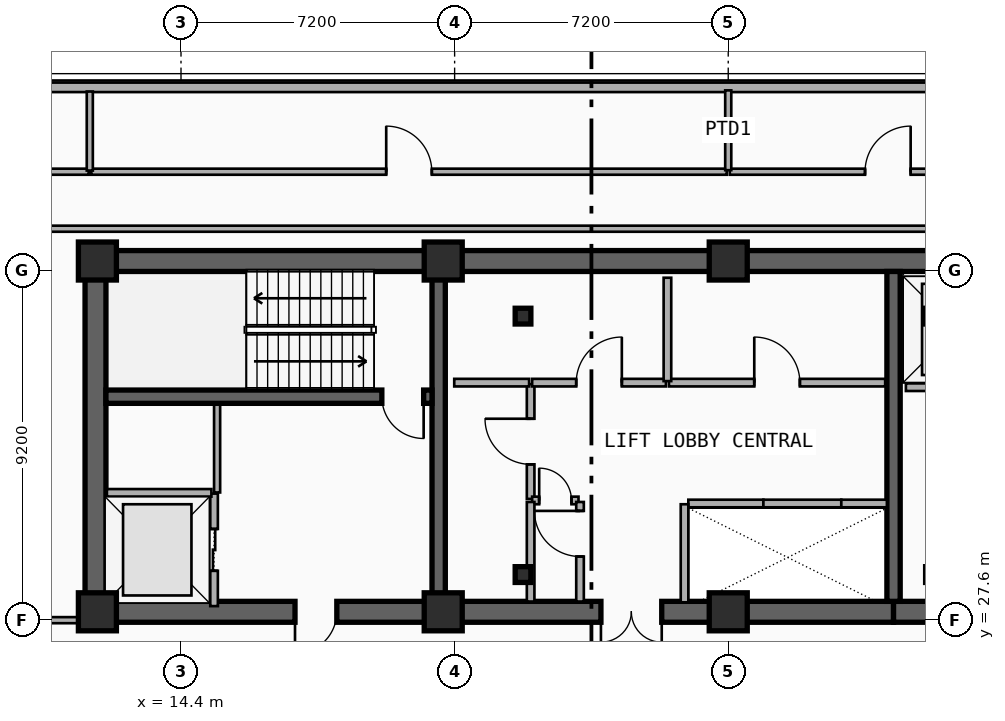
"""IFC4 building model, lengths in metres.
Left out: names, types, materials, properties, quantities, classifications, styles, units other than length and angle.
Written with IfcOpenShell. Run it as: python <this file> out.ifc"""

import sys

from ifc_helpers import new_model, si_unit, direction, frame, frame_2d, origin, origin_2d, place, context, subcontext, project, spatial, rectangle, i_section, extrude, element, fill, save


model = new_model("IFC4")
c1 = context("Model", 3, precision=1e-05, world=origin(), true_north=direction((0.0, 1.0)))
c2 = subcontext(c1, "Body", "Model", "MODEL_VIEW")
j1 = project(units=[si_unit("LENGTHUNIT", "METRE"), si_unit("PLANEANGLEUNIT", "RADIAN")], contexts=[c1])
p1 = place(None, origin())
s1 = spatial("IfcSite", under=j1, at=p1, CompositionType="ELEMENT")
p2 = place(p1, origin())
s2 = spatial("IfcBuilding", under=s1, at=p2, CompositionType="ELEMENT")
p3 = place(p2, frame((0.0, 0.0, 188.4)))
s3 = spatial("IfcBuildingStorey", under=s2, at=p3, CompositionType="ELEMENT", Elevation=188.4)
p4 = place(p3, frame((12.15, 37.05, 0.0), z_axis=(0.0, 0.0, 1.0), x_axis=(1.0, 0.0, 0.0)))
e1 = element("IfcWall", 1, at=p4, inside=s3, PredefinedType="SHEAR", context=c2, shape_type="SweptSolid", body=[
    extrude(rectangle(XDim=33.23, YDim=0.55, at=frame_2d((16.615, 0.0))), origin(), (0.0, 0.0, 1.0), 4.8),
])
p5 = place(p3, frame((21.18, 27.82, 0.0), z_axis=(0.0, 0.0, 1.0), x_axis=(-1.0, 0.0, 0.0)))
e2 = element("IfcWall", 2, at=p5, inside=s3, PredefinedType="SHEAR", context=c2, shape_type="SweptSolid", body=[
    extrude(rectangle(XDim=9.03, YDim=0.55, at=frame_2d((4.515, 0.0))), origin(), (0.0, 0.0, 1.0), 4.8),
])
p6 = place(p5, frame((2.68, 0.0, 0.0)))
e3 = element("IfcOpeningElement", 3, at=p6, cuts=e2, PredefinedType="OPENING", context=c2, shape_type="SweptSolid", body=[
    extrude(rectangle(XDim=1.1, YDim=2.15, at=frame_2d((0.55, 1.075))), frame((0.0, 0.285, 0.0), z_axis=(0.0, -1.0, 0.0), x_axis=(1.0, 0.0, 0.0)), (0.0, 0.0, 1.0), 0.57),
])
p7 = place(p3, frame((33.15, 27.82, 0.0), z_axis=(0.0, 0.0, 1.0), x_axis=(-1.0, 0.0, 0.0)))
e4 = element("IfcWall", 4, at=p7, inside=s3, PredefinedType="SHEAR", context=c2, shape_type="SweptSolid", body=[
    extrude(rectangle(XDim=11.97, YDim=0.55, at=frame_2d((5.985, 0.0))), origin(), (0.0, 0.0, 1.0), 4.8),
])
p8 = place(p7, frame((6.1, 0.0, 0.0)))
e5 = element("IfcOpeningElement", 5, at=p8, cuts=e4, PredefinedType="OPENING", context=c2, shape_type="SweptSolid", body=[
    extrude(rectangle(XDim=1.6, YDim=2.2, at=frame_2d((0.8, 1.1))), frame((0.0, 0.285, 0.0), z_axis=(0.0, -1.0, 0.0), x_axis=(1.0, 0.0, 0.0)), (0.0, 0.0, 1.0), 0.57),
])
p9 = place(p3, frame((45.38, 27.82, 0.0), z_axis=(0.0, 0.0, 1.0), x_axis=(-1.0, 0.0, 0.0)))
e6 = element("IfcWall", 6, at=p9, inside=s3, PredefinedType="SHEAR", context=c2, shape_type="SweptSolid", body=[
    extrude(rectangle(XDim=12.23, YDim=0.55, at=frame_2d((6.115, 0.0))), origin(), (0.0, 0.0, 1.0), 4.8),
])
p10 = place(p9, frame((9.93, 0.0, 0.0)))
e7 = element("IfcOpeningElement", 7, at=p10, cuts=e6, PredefinedType="OPENING", context=c2, shape_type="SweptSolid", body=[
    extrude(rectangle(XDim=1.1, YDim=2.15, at=frame_2d((0.55, 1.075))), frame((0.0, 0.285, 0.0), z_axis=(0.0, -1.0, 0.0), x_axis=(1.0, 0.0, 0.0)), (0.0, 0.0, 1.0), 0.57),
])
p11 = place(p9, frame((6.23, 0.0, 0.0)))
e8 = element("IfcOpeningElement", 8, at=p11, cuts=e6, PredefinedType="OPENING", context=c2, shape_type="SweptSolid", body=[
    extrude(rectangle(XDim=1.1, YDim=2.15, at=frame_2d((0.55, 1.075))), frame((0.0, 0.285, 0.0), z_axis=(0.0, -1.0, 0.0), x_axis=(1.0, 0.0, 0.0)), (0.0, 0.0, 1.0), 0.57),
])
p12 = place(p3, frame((12.15, 28.095, 0.0), z_axis=(0.0, 0.0, 1.0), x_axis=(0.0, 1.0, 0.0)))
e9 = element("IfcWall", 9, at=p12, inside=s3, PredefinedType="SHEAR", context=c2, shape_type="SweptSolid", body=[
    extrude(rectangle(XDim=8.68, YDim=0.55, at=frame_2d((4.34, 0.0))), origin(), (0.0, 0.0, 1.0), 4.8),
])
for number, where, z_axis, x_axis in (
    (10, (21.18, 28.095, 0.0), (0.0, 0.0, 1.0), (0.0, 1.0, 0.0)),
    (11, (33.15, 28.095, 0.0), (0.0, 0.0, 1.0), (0.0, 1.0, 0.0)),
):
    element("IfcWall", number, at=place(p3, frame(where, z_axis=z_axis, x_axis=x_axis)), inside=s3, PredefinedType="SHEAR", context=c2, shape_type="SweptSolid", body=[
        extrude(rectangle(XDim=8.68, YDim=0.35, at=frame_2d((4.34, 0.0))), origin(), (0.0, 0.0, 1.0), 4.8),
    ])
p13 = place(p3, frame((21.005, 33.48, 0.0), z_axis=(0.0, 0.0, 1.0), x_axis=(-1.0, 0.0, 0.0)))
e12 = element("IfcWall", 12, at=p13, inside=s3, PredefinedType="SHEAR", context=c2, shape_type="SweptSolid", body=[
    extrude(rectangle(XDim=8.58, YDim=0.35, at=frame_2d((4.29, 0.0))), origin(), (0.0, 0.0, 1.0), 4.8),
])
p14 = place(p13, frame((0.22, 0.0, 0.0)))
e13 = element("IfcOpeningElement", 13, at=p14, cuts=e12, PredefinedType="OPENING", context=c2, shape_type="SweptSolid", body=[
    extrude(rectangle(XDim=1.1, YDim=2.15, at=frame_2d((0.55, 1.075))), frame((0.0, 0.185, 0.0), z_axis=(0.0, -1.0, 0.0), x_axis=(1.0, 0.0, 0.0)), (0.0, 0.0, 1.0), 0.37),
])
for number, where, z_axis, x_axis in (
    (14, (23.4, 28.8, 0.0), (0.0, 0.0, 1.0), (1.0, 0.0, 0.0)),
    (15, (23.4, 35.6, 0.0), (0.0, 0.0, 1.0), (1.0, 0.0, 0.0)),
):
    element("IfcColumn", number, at=place(p3, frame(where, z_axis=z_axis, x_axis=x_axis)), inside=s3, PredefinedType="COLUMN", context=c2, shape_type="SweptSolid", body=[
        extrude(i_section(OverallWidth=0.413, OverallDepth=0.415, WebThickness=0.03, FlangeThickness=0.047, FilletRadius=0.015, at=origin_2d()), origin(), (0.0, 0.0, 1.0), 4.8),
    ])
for number, where, z_axis, x_axis in (
    (16, (12.2, 27.82, 0.0), (0.0, 0.0, 1.0), (1.0, 0.0, 0.0)),
    (17, (12.2, 37.05, 0.0), (0.0, 0.0, 1.0), (1.0, 0.0, 0.0)),
    (18, (21.3, 27.82, 0.0), (0.0, 0.0, 1.0), (1.0, 0.0, 0.0)),
    (19, (21.3, 37.05, 0.0), (0.0, 0.0, 1.0), (1.0, 0.0, 0.0)),
    (20, (28.8, 27.82, 0.0), (0.0, 0.0, 1.0), (1.0, 0.0, 0.0)),
    (21, (28.8, 37.05, 0.0), (0.0, 0.0, 1.0), (1.0, 0.0, 0.0)),
):
    element("IfcColumn", number, at=place(p3, frame(where, z_axis=z_axis, x_axis=x_axis)), inside=s3, PredefinedType="COLUMN", context=c2, shape_type="SweptSolid", body=[
        extrude(rectangle(XDim=1.0, YDim=1.0, at=origin_2d()), origin(), (0.0, 0.0, 1.0), 4.8),
    ])
p15 = place(p3, frame((9.6, 41.62, 0.0), z_axis=(0.0, 0.0, 1.0), x_axis=(1.0, 0.0, 0.0)))
e22 = element("IfcWall", 22, at=p15, inside=s3, PredefinedType="SOLIDWALL", context=c2, shape_type="SweptSolid", body=[
    extrude(rectangle(XDim=38.4, YDim=0.25, at=frame_2d((19.2, 0.0))), origin(), (0.0, 0.0, 1.0), 4.48),
])
p16 = place(p3, frame((15.27, 27.97, 0.0), z_axis=(0.0, 0.0, 1.0), x_axis=(0.0, 1.0, 0.0)))
e23 = element("IfcWall", 23, at=p16, inside=s3, PredefinedType="PARTITIONING", context=c2, shape_type="SweptSolid", body=[
    extrude(rectangle(XDim=2.96, YDim=0.2, at=frame_2d((1.48, 0.0))), origin(), (0.0, 0.0, 1.0), 3.55),
])
p17 = place(p16, frame((0.93, 0.0, 0.0)))
e24 = element("IfcOpeningElement", 24, at=p17, cuts=e23, PredefinedType="OPENING", context=c2, shape_type="SweptSolid", body=[
    extrude(rectangle(XDim=1.1, YDim=2.15, at=frame_2d((0.55, 1.075))), frame((0.0, 0.11, 0.0), z_axis=(0.0, -1.0, 0.0), x_axis=(1.0, 0.0, 0.0)), (0.0, 0.0, 1.0), 0.22),
])
p18 = place(p3, frame((12.45, 30.95, 0.0), z_axis=(0.0, 0.0, 1.0), x_axis=(1.0, 0.0, 0.0)))
e25 = element("IfcWall", 25, at=p18, inside=s3, PredefinedType="PARTITIONING", context=c2, shape_type="SweptSolid", body=[
    extrude(rectangle(XDim=2.75, YDim=0.2, at=frame_2d((1.375, 0.0))), origin(), (0.0, 0.0, 1.0), 3.55),
])
p19 = place(p3, frame((33.475, 33.73, 0.0), z_axis=(0.0, 0.0, 1.0), x_axis=(1.0, 0.0, 0.0)))
e26 = element("IfcWall", 26, at=p19, inside=s3, PredefinedType="PARTITIONING", context=c2, shape_type="SweptSolid", body=[
    extrude(rectangle(XDim=2.725, YDim=0.2, at=frame_2d((1.362, 0.0))), origin(), (0.0, 0.0, 1.0), 3.55),
])
p20 = place(p19, frame((0.812, 0.0, 0.0)))
e27 = element("IfcOpeningElement", 27, at=p20, cuts=e26, PredefinedType="OPENING", context=c2, shape_type="SweptSolid", body=[
    extrude(rectangle(XDim=1.1, YDim=2.15, at=frame_2d((0.55, 1.075))), frame((0.0, 0.11, 0.0), z_axis=(0.0, -1.0, 0.0), x_axis=(1.0, 0.0, 0.0)), (0.0, 0.0, 1.0), 0.22),
])
p21 = place(p3, frame((27.75, 30.67, 0.0), z_axis=(0.0, 0.0, 1.0), x_axis=(1.0, 0.0, 0.0)))
e28 = element("IfcWall", 28, at=p21, inside=s3, PredefinedType="PARTITIONING", context=c2, shape_type="SweptSolid", body=[
    extrude(rectangle(XDim=1.975, YDim=0.2, at=frame_2d((0.988, 0.0))), origin(), (0.0, 0.0, 1.0), 3.55),
])
p22 = place(p3, frame((27.65, 28.07, 0.0), z_axis=(0.0, 0.0, 1.0), x_axis=(0.0, 1.0, 0.0)))
e29 = element("IfcWall", 29, at=p22, inside=s3, PredefinedType="PARTITIONING", context=c2, shape_type="SweptSolid", body=[
    extrude(rectangle(XDim=2.58, YDim=0.2, at=frame_2d((1.29, 0.0))), origin(), (0.0, 0.0, 1.0), 3.55),
])
p23 = place(p3, frame((29.725, 30.67, 0.0), z_axis=(0.0, 0.0, 1.0), x_axis=(1.0, 0.0, 0.0)))
e30 = element("IfcWall", 30, at=p23, inside=s3, PredefinedType="PARTITIONING", context=c2, shape_type="SweptSolid", body=[
    extrude(rectangle(XDim=2.05, YDim=0.2, at=frame_2d((1.025, 0.0))), origin(), (0.0, 0.0, 1.0), 3.86),
])
p24 = place(p3, frame((31.775, 30.67, 0.0), z_axis=(0.0, 0.0, 1.0), x_axis=(1.0, 0.0, 0.0)))
e31 = element("IfcWall", 31, at=p24, inside=s3, PredefinedType="PARTITIONING", context=c2, shape_type="SweptSolid", body=[
    extrude(rectangle(XDim=1.2, YDim=0.2, at=frame_2d((0.6, 0.0))), origin(), (0.0, 0.0, 1.0), 3.86),
])
p25 = place(p3, frame((23.6, 30.79, 0.0), z_axis=(0.0, 0.0, 1.0), x_axis=(0.0, 1.0, 0.0)))
e32 = element("IfcWall", 32, at=p25, inside=s3, PredefinedType="PARTITIONING", context=c2, shape_type="SweptSolid", body=[
    extrude(rectangle(XDim=3.02, YDim=0.2, at=frame_2d((1.51, 0.0))), origin(), (0.0, 0.0, 1.0), 4.48),
])
p26 = place(p25, frame((0.91, 0.0, 0.0)))
e33 = element("IfcOpeningElement", 33, at=p26, cuts=e32, PredefinedType="OPENING", context=c2, shape_type="SweptSolid", body=[
    extrude(rectangle(XDim=1.2, YDim=2.15, at=frame_2d((0.6, 1.075))), frame((0.0, 0.11, 0.0), z_axis=(0.0, -1.0, 0.0), x_axis=(1.0, 0.0, 0.0)), (0.0, 0.0, 1.0), 0.22),
])
p27 = place(p3, frame((23.64, 30.75, 0.0), z_axis=(0.0, 0.0, 1.0), x_axis=(1.0, 0.0, 0.0)))
e34 = element("IfcWall", 34, at=p27, inside=s3, PredefinedType="PARTITIONING", context=c2, shape_type="SweptSolid", body=[
    extrude(rectangle(XDim=1.22, YDim=0.2, at=frame_2d((0.61, 0.0))), origin(), (0.0, 0.0, 1.0), 4.48),
])
p28 = place(p27, frame((0.185, 0.0, 0.0)))
e35 = element("IfcOpeningElement", 35, at=p28, cuts=e34, PredefinedType="OPENING", context=c2, shape_type="SweptSolid", body=[
    extrude(rectangle(XDim=0.85, YDim=2.1, at=frame_2d((0.425, 1.05))), frame((0.0, 0.11, 0.0), z_axis=(0.0, -1.0, 0.0), x_axis=(1.0, 0.0, 0.0)), (0.0, 0.0, 1.0), 0.22),
])
p29 = place(p3, frame((23.64, 33.85, 0.0), z_axis=(0.0, 0.0, 1.0), x_axis=(1.0, 0.0, 0.0)))
e36 = element("IfcWall", 36, at=p29, inside=s3, PredefinedType="PARTITIONING", context=c2, shape_type="SweptSolid", body=[
    extrude(rectangle(XDim=3.52, YDim=0.2, at=frame_2d((1.76, 0.0))), origin(), (0.0, 0.0, 1.0), 4.48),
])
p30 = place(p29, frame((1.16, 0.0, 0.0)))
e37 = element("IfcOpeningElement", 37, at=p30, cuts=e36, PredefinedType="OPENING", context=c2, shape_type="SweptSolid", body=[
    extrude(rectangle(XDim=1.2, YDim=2.15, at=frame_2d((0.6, 1.075))), frame((0.0, 0.11, 0.0), z_axis=(0.0, -1.0, 0.0), x_axis=(1.0, 0.0, 0.0)), (0.0, 0.0, 1.0), 0.22),
])
p31 = place(p3, frame((27.24, 33.85, 0.0), z_axis=(0.0, 0.0, 1.0), x_axis=(1.0, 0.0, 0.0)))
e38 = element("IfcWall", 38, at=p31, inside=s3, PredefinedType="PARTITIONING", context=c2, shape_type="SweptSolid", body=[
    extrude(rectangle(XDim=5.69, YDim=0.2, at=frame_2d((2.845, 0.0))), origin(), (0.0, 0.0, 1.0), 3.55),
])
p32 = place(p31, frame((2.245, 0.0, 0.0)))
e39 = element("IfcOpeningElement", 39, at=p32, cuts=e38, PredefinedType="OPENING", context=c2, shape_type="SweptSolid", body=[
    extrude(rectangle(XDim=1.2, YDim=2.15, at=frame_2d((0.6, 1.075))), frame((0.0, 0.11, 0.0), z_axis=(0.0, -1.0, 0.0), x_axis=(1.0, 0.0, 0.0)), (0.0, 0.0, 1.0), 0.22),
])
p33 = place(p3, frame((24.9, 28.09, 0.0), z_axis=(0.0, 0.0, 1.0), x_axis=(0.0, 1.0, 0.0)))
e40 = element("IfcWall", 40, at=p33, inside=s3, PredefinedType="PARTITIONING", context=c2, shape_type="SweptSolid", body=[
    extrude(rectangle(XDim=2.62, YDim=0.2, at=frame_2d((1.31, 0.0))), origin(), (0.0, 0.0, 1.0), 3.86),
])
p34 = place(p33, frame((1.185, 0.0, 0.0)))
e41 = element("IfcOpeningElement", 41, at=p34, cuts=e40, PredefinedType="OPENING", context=c2, shape_type="SweptSolid", body=[
    extrude(rectangle(XDim=1.2, YDim=2.15, at=frame_2d((0.6, 1.075))), frame((0.0, 0.11, 0.0), z_axis=(0.0, -1.0, 0.0), x_axis=(1.0, 0.0, 0.0)), (0.0, 0.0, 1.0), 0.22),
])
p35 = place(p3, frame((23.6, 28.09, 0.0), z_axis=(0.0, 0.0, 1.0), x_axis=(0.0, 1.0, 0.0)))
e42 = element("IfcWall", 42, at=p35, inside=s3, PredefinedType="PARTITIONING", context=c2, shape_type="SweptSolid", body=[
    extrude(rectangle(XDim=2.62, YDim=0.2, at=frame_2d((1.31, 0.0))), origin(), (0.0, 0.0, 1.0), 3.86),
])
p36 = place(p3, frame((21.59, 33.85, 0.0), z_axis=(0.0, 0.0, 1.0), x_axis=(1.0, 0.0, 0.0)))
e43 = element("IfcWall", 43, at=p36, inside=s3, PredefinedType="PARTITIONING", context=c2, shape_type="SweptSolid", body=[
    extrude(rectangle(XDim=1.97, YDim=0.2, at=frame_2d((0.985, 0.0))), origin(), (0.0, 0.0, 1.0), 3.55),
])
p37 = place(p3, frame((27.2, 33.89, 0.0), z_axis=(0.0, 0.0, 1.0), x_axis=(0.0, 1.0, 0.0)))
e44 = element("IfcWall", 44, at=p37, inside=s3, PredefinedType="PARTITIONING", context=c2, shape_type="SweptSolid", body=[
    extrude(rectangle(XDim=2.72, YDim=0.2, at=frame_2d((1.36, 0.0))), origin(), (0.0, 0.0, 1.0), 4.48),
])
p38 = place(p3, frame((12.04, 39.4, 0.0), z_axis=(0.0, 0.0, 1.0), x_axis=(1.0, 0.0, 0.0)))
e45 = element("IfcWall", 45, at=p38, inside=s3, PredefinedType="PARTITIONING", context=c2, shape_type="SweptSolid", body=[
    extrude(rectangle(XDim=16.72, YDim=0.16, at=frame_2d((8.36, 0.0))), origin(), (0.0, 0.0, 1.0), 4.48),
])
p39 = place(p38, frame((7.76, 0.0, 0.0)))
e46 = element("IfcOpeningElement", 46, at=p39, cuts=e45, PredefinedType="OPENING", context=c2, shape_type="SweptSolid", body=[
    extrude(rectangle(XDim=1.2, YDim=2.15, at=frame_2d((0.6, 1.075))), frame((0.0, 0.09, 0.0), z_axis=(0.0, -1.0, 0.0), x_axis=(1.0, 0.0, 0.0)), (0.0, 0.0, 1.0), 0.18),
])
p40 = place(p3, frame((28.84, 39.4, 0.0), z_axis=(0.0, 0.0, 1.0), x_axis=(1.0, 0.0, 0.0)))
e47 = element("IfcWall", 47, at=p40, inside=s3, PredefinedType="PARTITIONING", context=c2, shape_type="SweptSolid", body=[
    extrude(rectangle(XDim=8.32, YDim=0.16, at=frame_2d((4.16, 0.0))), origin(), (0.0, 0.0, 1.0), 4.48),
])
p41 = place(p40, frame((3.56, 0.0, 0.0)))
e48 = element("IfcOpeningElement", 48, at=p41, cuts=e47, PredefinedType="OPENING", context=c2, shape_type="SweptSolid", body=[
    extrude(rectangle(XDim=1.2, YDim=2.15, at=frame_2d((0.6, 1.075))), frame((0.0, 0.09, 0.0), z_axis=(0.0, -1.0, 0.0), x_axis=(1.0, 0.0, 0.0)), (0.0, 0.0, 1.0), 0.18),
])
p42 = place(p3, frame((28.8, 39.44, 0.0), z_axis=(0.0, 0.0, 1.0), x_axis=(0.0, 1.0, 0.0)))
e49 = element("IfcWall", 49, at=p42, inside=s3, PredefinedType="PARTITIONING", context=c2, shape_type="SweptSolid", body=[
    extrude(rectangle(XDim=2.1, YDim=0.16, at=frame_2d((1.05, 0.0))), origin(), (0.0, 0.0, 1.0), 4.48),
])
p43 = place(p3, frame((15.35, 30.96, 0.0), z_axis=(0.0, 0.0, 1.0), x_axis=(0.0, 1.0, 0.0)))
e50 = element("IfcWall", 50, at=p43, inside=s3, PredefinedType="PARTITIONING", context=c2, shape_type="SweptSolid", body=[
    extrude(rectangle(XDim=2.31, YDim=0.16, at=frame_2d((1.155, 0.0))), origin(), (0.0, 0.0, 1.0), 4.48),
])
p44 = place(p3, frame((5.69, 27.6, 0.0), z_axis=(0.0, 0.0, 1.0), x_axis=(1.0, 0.0, 0.0)))
e51 = element("IfcWall", 51, at=p44, inside=s3, PredefinedType="PARTITIONING", context=c2, shape_type="SweptSolid", body=[
    extrude(rectangle(XDim=6.43, YDim=0.16, at=frame_2d((3.215, 0.0))), origin(), (0.0, 0.0, 1.0), 3.55),
])
p45 = place(p3, frame((9.58, 37.9, 0.0), z_axis=(0.0, 0.0, 1.0), x_axis=(1.0, 0.0, 0.0)))
e52 = element("IfcWall", 52, at=p45, inside=s3, PredefinedType="PARTITIONING", context=c2, shape_type="SweptSolid", body=[
    extrude(rectangle(XDim=36.74, YDim=0.16, at=frame_2d((18.37, 0.0))), origin(), (0.0, 0.0, 1.0), 4.48),
])
p46 = place(p3, frame((9.58, 39.4, 0.0), z_axis=(0.0, 0.0, 1.0), x_axis=(1.0, 0.0, 0.0)))
e53 = element("IfcWall", 53, at=p46, inside=s3, PredefinedType="PARTITIONING", context=c2, shape_type="SweptSolid", body=[
    extrude(rectangle(XDim=2.39, YDim=0.16, at=frame_2d((1.195, 0.0))), origin(), (0.0, 0.0, 1.0), 4.48),
])
p47 = place(p3, frame((12.0, 39.43, 0.0), z_axis=(0.0, 0.0, 1.0), x_axis=(0.0, 1.0, 0.0)))
e54 = element("IfcWall", 54, at=p47, inside=s3, PredefinedType="PARTITIONING", context=c2, shape_type="SweptSolid", body=[
    extrude(rectangle(XDim=2.08, YDim=0.16, at=frame_2d((1.04, 0.0))), origin(), (0.0, 0.0, 1.0), 4.48),
])
p48 = place(p17, origin())
e55 = element("IfcDoor", 55, at=p48, inside=s3, OperationType="DOUBLE_DOOR_SLIDING", PredefinedType="DOOR", context=c2, shape_type="SweptSolid", body=[
    extrude(rectangle(XDim=1.1, YDim=2.15, at=frame_2d((0.55, 1.075))), frame((0.0, 0.025, 0.0), z_axis=(0.0, -1.0, 0.0), x_axis=(1.0, 0.0, 0.0)), (0.0, 0.0, 1.0), 0.05),
])
fill(e24, e55)
p49 = place(p14, origin())
e56 = element("IfcDoor", 56, at=p49, inside=s3, OperationType="SINGLE_SWING_LEFT", PredefinedType="DOOR", context=c2, shape_type="SweptSolid", body=[
    extrude(rectangle(XDim=1.1, YDim=2.15, at=frame_2d((0.55, 1.075))), frame((0.0, 0.025, 0.0), z_axis=(0.0, -1.0, 0.0), x_axis=(1.0, 0.0, 0.0)), (0.0, 0.0, 1.0), 0.05),
])
fill(e13, e56)
p50 = place(p6, origin())
e57 = element("IfcDoor", 57, at=p50, inside=s3, OperationType="SINGLE_SWING_RIGHT", PredefinedType="DOOR", context=c2, shape_type="SweptSolid", body=[
    extrude(rectangle(XDim=1.1, YDim=2.15, at=frame_2d((0.55, 1.075))), frame((0.0, 0.025, 0.0), z_axis=(0.0, -1.0, 0.0), x_axis=(1.0, 0.0, 0.0)), (0.0, 0.0, 1.0), 0.05),
])
fill(e3, e57)
p51 = place(p8, origin())
e58 = element("IfcDoor", 58, at=p51, inside=s3, OperationType="SINGLE_SWING_LEFT", PredefinedType="DOOR", context=c2, shape_type="SweptSolid", body=[
    extrude(rectangle(XDim=1.6, YDim=2.2, at=frame_2d((0.8, 1.1))), frame((0.0, 0.025, 0.0), z_axis=(0.0, -1.0, 0.0), x_axis=(1.0, 0.0, 0.0)), (0.0, 0.0, 1.0), 0.05),
])
fill(e5, e58)
p52 = place(p26, origin())
e59 = element("IfcDoor", 59, at=p52, inside=s3, OperationType="SINGLE_SWING_RIGHT", PredefinedType="DOOR", context=c2, shape_type="SweptSolid", body=[
    extrude(rectangle(XDim=1.2, YDim=2.15, at=frame_2d((0.6, 1.075))), frame((0.0, 0.025, 0.0), z_axis=(0.0, -1.0, 0.0), x_axis=(1.0, 0.0, 0.0)), (0.0, 0.0, 1.0), 0.05),
])
fill(e33, e59)
p53 = place(p28, origin())
e60 = element("IfcDoor", 60, at=p53, inside=s3, OperationType="SINGLE_SWING_LEFT", PredefinedType="DOOR", context=c2, shape_type="SweptSolid", body=[
    extrude(rectangle(XDim=0.85, YDim=2.1, at=frame_2d((0.425, 1.05))), frame((0.0, 0.025, 0.0), z_axis=(0.0, -1.0, 0.0), x_axis=(1.0, 0.0, 0.0)), (0.0, 0.0, 1.0), 0.05),
])
fill(e35, e60)
p54 = place(p30, origin())
e61 = element("IfcDoor", 61, at=p54, inside=s3, OperationType="SINGLE_SWING_RIGHT", PredefinedType="DOOR", context=c2, shape_type="SweptSolid", body=[
    extrude(rectangle(XDim=1.2, YDim=2.15, at=frame_2d((0.6, 1.075))), frame((0.0, 0.025, 0.0), z_axis=(0.0, -1.0, 0.0), x_axis=(1.0, 0.0, 0.0)), (0.0, 0.0, 1.0), 0.05),
])
fill(e37, e61)
p55 = place(p32, origin())
e62 = element("IfcDoor", 62, at=p55, inside=s3, OperationType="SINGLE_SWING_LEFT", PredefinedType="DOOR", context=c2, shape_type="SweptSolid", body=[
    extrude(rectangle(XDim=1.2, YDim=2.15, at=frame_2d((0.6, 1.075))), frame((0.0, 0.025, 0.0), z_axis=(0.0, -1.0, 0.0), x_axis=(1.0, 0.0, 0.0)), (0.0, 0.0, 1.0), 0.05),
])
fill(e39, e62)
p56 = place(p34, origin())
e63 = element("IfcDoor", 63, at=p56, inside=s3, OperationType="SINGLE_SWING_RIGHT", PredefinedType="DOOR", context=c2, shape_type="SweptSolid", body=[
    extrude(rectangle(XDim=1.2, YDim=2.15, at=frame_2d((0.6, 1.075))), frame((0.0, 0.025, 0.0), z_axis=(0.0, -1.0, 0.0), x_axis=(1.0, 0.0, 0.0)), (0.0, 0.0, 1.0), 0.05),
])
fill(e41, e63)
p57 = place(p39, origin())
e64 = element("IfcDoor", 64, at=p57, inside=s3, OperationType="SINGLE_SWING_LEFT", PredefinedType="DOOR", context=c2, shape_type="SweptSolid", body=[
    extrude(rectangle(XDim=1.2, YDim=2.15, at=frame_2d((0.6, 1.075))), frame((0.0, 0.025, 0.0), z_axis=(0.0, -1.0, 0.0), x_axis=(1.0, 0.0, 0.0)), (0.0, 0.0, 1.0), 0.05),
])
fill(e46, e64)
p58 = place(p41, origin())
e65 = element("IfcDoor", 65, at=p58, inside=s3, OperationType="SINGLE_SWING_RIGHT", PredefinedType="DOOR", context=c2, shape_type="SweptSolid", body=[
    extrude(rectangle(XDim=1.2, YDim=2.15, at=frame_2d((0.6, 1.075))), frame((0.0, 0.025, 0.0), z_axis=(0.0, -1.0, 0.0), x_axis=(1.0, 0.0, 0.0)), (0.0, 0.0, 1.0), 0.05),
])
fill(e48, e65)
save(model, sys.argv[1])
